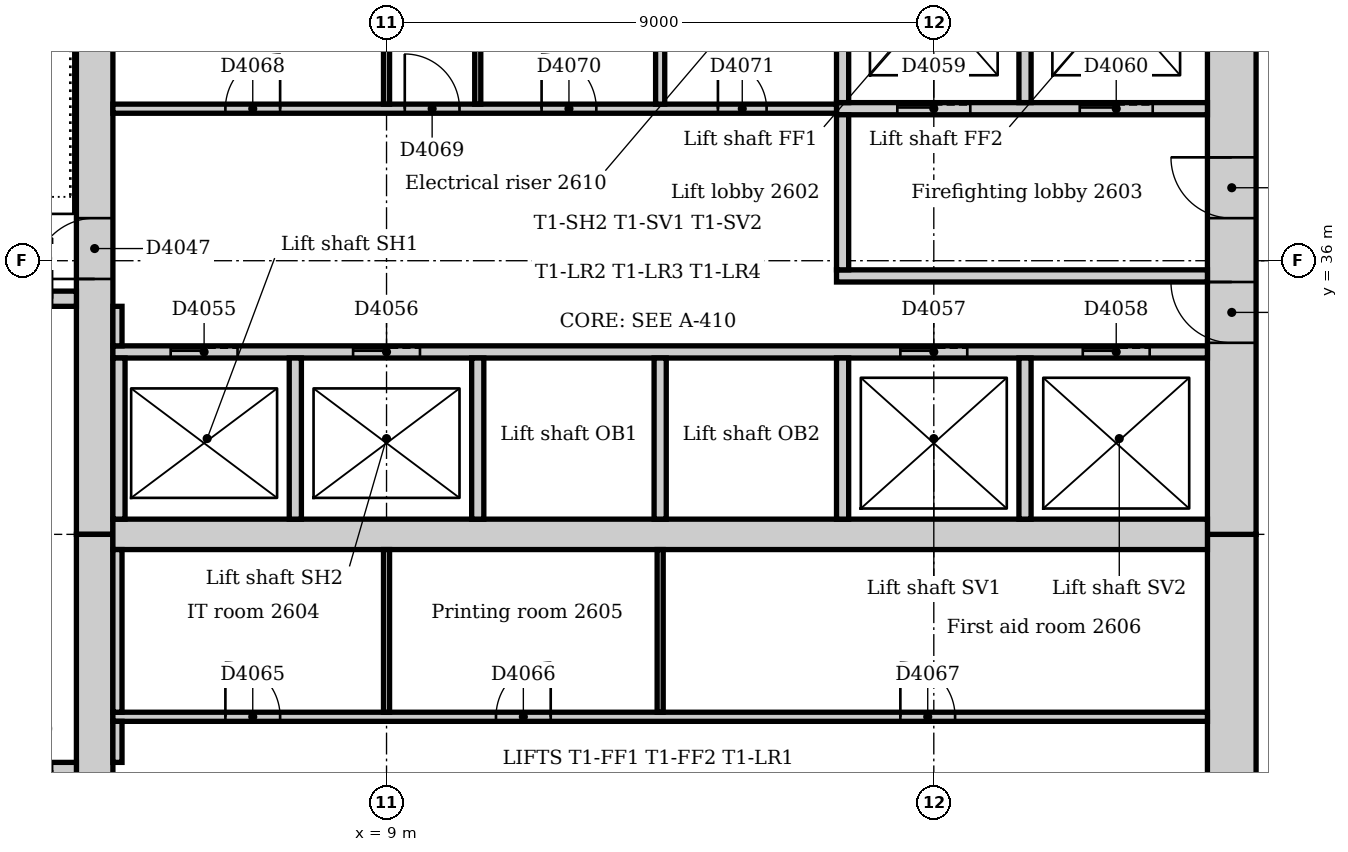
"""IFC4 building model, lengths in metres.
Left out: names, types, materials, properties, quantities, classifications, styles, units other than length and angle.
Written with IfcOpenShell. Run it as: python <this file> out.ifc"""

import sys

from ifc_helpers import new_model, si_unit, direction, frame, frame_2d, origin, place, context, subcontext, project, spatial, rectangle, extrude, element, fill, save


model = new_model("IFC4")
c1 = context("Model", 3, precision=1e-05, world=origin(), true_north=direction((0.0, 1.0)))
c2 = subcontext(c1, "Body", "Model", "MODEL_VIEW")
j1 = project(units=[si_unit("LENGTHUNIT", "METRE"), si_unit("PLANEANGLEUNIT", "RADIAN")], contexts=[c1])
p1 = place(None, origin())
s1 = spatial("IfcSite", under=j1, at=p1, CompositionType="ELEMENT")
p2 = place(p1, origin())
s2 = spatial("IfcBuilding", under=s1, at=p2, CompositionType="ELEMENT")
p3 = place(p2, frame((0.0, 0.0, 112.0)))
s3 = spatial("IfcBuildingStorey", under=s2, at=p3, CompositionType="ELEMENT", Elevation=112.0)
p4 = place(p3, frame((22.9, 21.0, 0.0), z_axis=(0.0, 0.0, 1.0), x_axis=(0.0, 1.0, 0.0)))
e1 = element("IfcWall", 1, at=p4, inside=s3, PredefinedType="SOLIDWALL", context=c2, shape_type="SweptSolid", body=[
    extrude(rectangle(XDim=10.5, YDim=0.8, at=frame_2d((5.25, 0.0))), origin(), (0.0, 0.0, 1.0), 4.0),
])
p5 = place(p4, frame((4.35, 0.0, 0.0)))
e2 = element("IfcOpeningElement", 2, at=p5, cuts=e1, PredefinedType="OPENING", context=c2, shape_type="SweptSolid", body=[
    extrude(rectangle(XDim=1.8, YDim=2.1, at=frame_2d((0.9, 1.05))), frame((0.0, 0.41, 0.0), z_axis=(0.0, -1.0, 0.0), x_axis=(1.0, 0.0, 0.0)), (0.0, 0.0, 1.0), 0.82),
])
p6 = place(p3, frame((22.9, 31.5, 0.0), z_axis=(0.0, 0.0, 1.0), x_axis=(0.0, 1.0, 0.0)))
e3 = element("IfcWall", 3, at=p6, inside=s3, PredefinedType="SOLIDWALL", context=c2, shape_type="SweptSolid", body=[
    extrude(rectangle(XDim=10.5, YDim=0.8, at=frame_2d((5.25, 0.0))), origin(), (0.0, 0.0, 1.0), 4.0),
])
p7 = place(p6, frame((3.15, 0.0, 0.0)))
e4 = element("IfcOpeningElement", 4, at=p7, cuts=e3, PredefinedType="OPENING", context=c2, shape_type="SweptSolid", body=[
    extrude(rectangle(XDim=1.0, YDim=2.1, at=frame_2d((0.5, 1.05))), frame((0.0, 0.41, 0.0), z_axis=(0.0, -1.0, 0.0), x_axis=(1.0, 0.0, 0.0)), (0.0, 0.0, 1.0), 0.82),
])
p8 = place(p6, frame((5.2, 0.0, 0.0)))
e5 = element("IfcOpeningElement", 5, at=p8, cuts=e3, PredefinedType="OPENING", context=c2, shape_type="SweptSolid", body=[
    extrude(rectangle(XDim=1.0, YDim=2.1, at=frame_2d((0.5, 1.05))), frame((0.0, 0.41, 0.0), z_axis=(0.0, -1.0, 0.0), x_axis=(1.0, 0.0, 0.0)), (0.0, 0.0, 1.0), 0.82),
])
p9 = place(p3, frame((4.2, 42.0, 0.0), z_axis=(0.0, 0.0, 1.0), x_axis=(0.0, -1.0, 0.0)))
e6 = element("IfcWall", 6, at=p9, inside=s3, PredefinedType="SOLIDWALL", context=c2, shape_type="SweptSolid", body=[
    extrude(rectangle(XDim=10.5, YDim=0.6, at=frame_2d((5.25, 0.0))), origin(), (0.0, 0.0, 1.0), 4.0),
])
p10 = place(p9, frame((5.3, 0.0, 0.0)))
e7 = element("IfcOpeningElement", 7, at=p10, cuts=e6, PredefinedType="OPENING", context=c2, shape_type="SweptSolid", body=[
    extrude(rectangle(XDim=1.0, YDim=2.1, at=frame_2d((0.5, 1.05))), frame((0.0, 0.31, 0.0), z_axis=(0.0, -1.0, 0.0), x_axis=(1.0, 0.0, 0.0)), (0.0, 0.0, 1.0), 0.62),
])
p11 = place(p3, frame((4.2, 31.5, 0.0), z_axis=(0.0, 0.0, 1.0), x_axis=(0.0, -1.0, 0.0)))
e8 = element("IfcWall", 8, at=p11, inside=s3, PredefinedType="SOLIDWALL", context=c2, shape_type="SweptSolid", body=[
    extrude(rectangle(XDim=10.5, YDim=0.6, at=frame_2d((5.25, 0.0))), origin(), (0.0, 0.0, 1.0), 4.0),
])
p12 = place(p11, frame((4.25, 0.0, 0.0)))
e9 = element("IfcOpeningElement", 9, at=p12, cuts=e8, PredefinedType="OPENING", context=c2, shape_type="SweptSolid", body=[
    extrude(rectangle(XDim=1.0, YDim=2.1, at=frame_2d((0.5, 1.05))), frame((0.0, 0.31, 0.0), z_axis=(0.0, -1.0, 0.0), x_axis=(1.0, 0.0, 0.0)), (0.0, 0.0, 1.0), 0.62),
])
p13 = place(p3, frame((4.5, 31.5, 0.0), z_axis=(0.0, 0.0, 1.0), x_axis=(1.0, 0.0, 0.0)))
e10 = element("IfcWall", 10, at=p13, inside=s3, PredefinedType="SOLIDWALL", context=c2, shape_type="SweptSolid", body=[
    extrude(rectangle(XDim=18.0, YDim=0.5, at=frame_2d((9.0, 0.0))), origin(), (0.0, 0.0, 1.0), 4.0),
])
p14 = place(p3, frame((3.9, 27.625, 0.0), z_axis=(0.0, 0.0, 1.0), x_axis=(-1.0, 0.0, 0.0)))
e11 = element("IfcWall", 11, at=p14, inside=s3, PredefinedType="SOLIDWALL", context=c2, shape_type="SweptSolid", body=[
    extrude(rectangle(XDim=3.54, YDim=0.25, at=frame_2d((1.77, 0.0))), origin(), (0.0, 0.0, 1.0), 4.0),
])
p15 = place(p14, frame((0.4, 0.0, 0.0)))
e12 = element("IfcOpeningElement", 12, at=p15, cuts=e11, PredefinedType="OPENING", context=c2, shape_type="SweptSolid", body=[
    extrude(rectangle(XDim=1.0, YDim=2.1, at=frame_2d((0.5, 1.05))), frame((0.0, 0.135, 0.0), z_axis=(0.0, -1.0, 0.0), x_axis=(1.0, 0.0, 0.0)), (0.0, 0.0, 1.0), 0.27),
])
p16 = place(p3, frame((0.36, 35.375, 0.0), z_axis=(0.0, 0.0, 1.0), x_axis=(1.0, 0.0, 0.0)))
e13 = element("IfcWall", 13, at=p16, inside=s3, PredefinedType="SOLIDWALL", context=c2, shape_type="SweptSolid", body=[
    extrude(rectangle(XDim=3.54, YDim=0.25, at=frame_2d((1.77, 0.0))), origin(), (0.0, 0.0, 1.0), 4.0),
])
p17 = place(p16, frame((2.14, 0.0, 0.0)))
e14 = element("IfcOpeningElement", 14, at=p17, cuts=e13, PredefinedType="OPENING", context=c2, shape_type="SweptSolid", body=[
    extrude(rectangle(XDim=1.0, YDim=2.1, at=frame_2d((0.5, 1.05))), frame((0.0, 0.135, 0.0), z_axis=(0.0, -1.0, 0.0), x_axis=(1.0, 0.0, 0.0)), (0.0, 0.0, 1.0), 0.27),
])
p18 = place(p3, frame((16.4, 35.75, 0.0), z_axis=(0.0, 0.0, 1.0), x_axis=(1.0, 0.0, 0.0)))
e15 = element("IfcWall", 15, at=p18, inside=s3, PredefinedType="PARTITIONING", context=c2, shape_type="SweptSolid", body=[
    extrude(rectangle(XDim=6.1, YDim=0.2, at=frame_2d((3.05, 0.0))), origin(), (0.0, 0.0, 1.0), 3.85),
])
p19 = place(p3, frame((16.4, 38.5, 0.0), z_axis=(0.0, 0.0, 1.0), x_axis=(1.0, 0.0, 0.0)))
e16 = element("IfcWall", 16, at=p19, inside=s3, PredefinedType="PARTITIONING", context=c2, shape_type="SweptSolid", body=[
    extrude(rectangle(XDim=6.1, YDim=0.2, at=frame_2d((3.05, 0.0))), origin(), (0.0, 0.0, 1.0), 3.85),
])
p20 = place(p19, frame((1.0, 0.0, 0.0)))
e17 = element("IfcOpeningElement", 17, at=p20, cuts=e16, PredefinedType="OPENING", context=c2, shape_type="SweptSolid", body=[
    extrude(rectangle(XDim=1.2, YDim=2.1, at=frame_2d((0.6, 1.05))), frame((0.0, 0.11, 0.0), z_axis=(0.0, -1.0, 0.0), x_axis=(1.0, 0.0, 0.0)), (0.0, 0.0, 1.0), 0.22),
])
p21 = place(p19, frame((4.0, 0.0, 0.0)))
e18 = element("IfcOpeningElement", 18, at=p21, cuts=e16, PredefinedType="OPENING", context=c2, shape_type="SweptSolid", body=[
    extrude(rectangle(XDim=1.2, YDim=2.1, at=frame_2d((0.6, 1.05))), frame((0.0, 0.11, 0.0), z_axis=(0.0, -1.0, 0.0), x_axis=(1.0, 0.0, 0.0)), (0.0, 0.0, 1.0), 0.22),
])
p22 = place(p3, frame((16.5, 35.85, 0.0), z_axis=(0.0, 0.0, 1.0), x_axis=(0.0, 1.0, 0.0)))
e19 = element("IfcWall", 19, at=p22, inside=s3, PredefinedType="PARTITIONING", context=c2, shape_type="SweptSolid", body=[
    extrude(rectangle(XDim=2.55, YDim=0.2, at=frame_2d((1.275, 0.0))), origin(), (0.0, 0.0, 1.0), 3.85),
])
p23 = place(p3, frame((4.5, 34.5, 0.0), z_axis=(0.0, 0.0, 1.0), x_axis=(1.0, 0.0, 0.0)))
e20 = element("IfcWall", 20, at=p23, inside=s3, PredefinedType="PARTITIONING", context=c2, shape_type="SweptSolid", body=[
    extrude(rectangle(XDim=18.0, YDim=0.2, at=frame_2d((9.0, 0.0))), origin(), (0.0, 0.0, 1.0), 3.85),
])
p24 = place(p23, frame((0.95, 0.0, 0.0)))
e21 = element("IfcOpeningElement", 21, at=p24, cuts=e20, PredefinedType="OPENING", context=c2, shape_type="SweptSolid", body=[
    extrude(rectangle(XDim=1.1, YDim=2.1, at=frame_2d((0.55, 1.05))), frame((0.0, 0.11, 0.0), z_axis=(0.0, -1.0, 0.0), x_axis=(1.0, 0.0, 0.0)), (0.0, 0.0, 1.0), 0.22),
])
p25 = place(p23, frame((3.95, 0.0, 0.0)))
e22 = element("IfcOpeningElement", 22, at=p25, cuts=e20, PredefinedType="OPENING", context=c2, shape_type="SweptSolid", body=[
    extrude(rectangle(XDim=1.1, YDim=2.1, at=frame_2d((0.55, 1.05))), frame((0.0, 0.11, 0.0), z_axis=(0.0, -1.0, 0.0), x_axis=(1.0, 0.0, 0.0)), (0.0, 0.0, 1.0), 0.22),
])
p26 = place(p23, frame((12.95, 0.0, 0.0)))
e23 = element("IfcOpeningElement", 23, at=p26, cuts=e20, PredefinedType="OPENING", context=c2, shape_type="SweptSolid", body=[
    extrude(rectangle(XDim=1.1, YDim=2.1, at=frame_2d((0.55, 1.05))), frame((0.0, 0.11, 0.0), z_axis=(0.0, -1.0, 0.0), x_axis=(1.0, 0.0, 0.0)), (0.0, 0.0, 1.0), 0.22),
])
p27 = place(p23, frame((15.95, 0.0, 0.0)))
e24 = element("IfcOpeningElement", 24, at=p27, cuts=e20, PredefinedType="OPENING", context=c2, shape_type="SweptSolid", body=[
    extrude(rectangle(XDim=1.1, YDim=2.1, at=frame_2d((0.55, 1.05))), frame((0.0, 0.11, 0.0), z_axis=(0.0, -1.0, 0.0), x_axis=(1.0, 0.0, 0.0)), (0.0, 0.0, 1.0), 0.22),
])
for number, where, z_axis, x_axis in (
    (25, (16.5, 38.6, 0.0), (0.0, 0.0, 1.0), (0.0, 1.0, 0.0)),
    (26, (19.5, 38.6, 0.0), (0.0, 0.0, 1.0), (0.0, 1.0, 0.0)),
):
    element("IfcWall", number, at=place(p3, frame(where, z_axis=z_axis, x_axis=x_axis)), inside=s3, PredefinedType="PARTITIONING", context=c2, shape_type="SweptSolid", body=[
        extrude(rectangle(XDim=3.4, YDim=0.2, at=frame_2d((1.7, 0.0))), origin(), (0.0, 0.0, 1.0), 3.85),
    ])
for number, where, z_axis, x_axis in (
    (27, (4.6, 31.75, 0.0), (0.0, 0.0, 1.0), (0.0, 1.0, 0.0)),
    (28, (7.5, 31.75, 0.0), (0.0, 0.0, 1.0), (0.0, 1.0, 0.0)),
    (29, (10.5, 31.75, 0.0), (0.0, 0.0, 1.0), (0.0, 1.0, 0.0)),
    (30, (13.5, 31.75, 0.0), (0.0, 0.0, 1.0), (0.0, 1.0, 0.0)),
    (31, (16.5, 31.75, 0.0), (0.0, 0.0, 1.0), (0.0, 1.0, 0.0)),
    (32, (19.5, 31.75, 0.0), (0.0, 0.0, 1.0), (0.0, 1.0, 0.0)),
):
    element("IfcWall", number, at=place(p3, frame(where, z_axis=z_axis, x_axis=x_axis)), inside=s3, PredefinedType="PARTITIONING", context=c2, shape_type="SweptSolid", body=[
        extrude(rectangle(XDim=2.65, YDim=0.2, at=frame_2d((1.325, 0.0))), origin(), (0.0, 0.0, 1.0), 3.85),
    ])
p28 = place(p3, frame((4.5, 28.5, 0.0), z_axis=(0.0, 0.0, 1.0), x_axis=(1.0, 0.0, 0.0)))
e33 = element("IfcWall", 33, at=p28, inside=s3, PredefinedType="PARTITIONING", context=c2, shape_type="SweptSolid", body=[
    extrude(rectangle(XDim=18.0, YDim=0.15, at=frame_2d((9.0, 0.0))), origin(), (0.0, 0.0, 1.0), 3.85),
])
p29 = place(p28, frame((1.85, 0.0, 0.0)))
e34 = element("IfcOpeningElement", 34, at=p29, cuts=e33, PredefinedType="OPENING", context=c2, shape_type="SweptSolid", body=[
    extrude(rectangle(XDim=0.9, YDim=2.1, at=frame_2d((0.45, 1.05))), frame((0.0, 0.085, 0.0), z_axis=(0.0, -1.0, 0.0), x_axis=(1.0, 0.0, 0.0)), (0.0, 0.0, 1.0), 0.17),
])
p30 = place(p28, frame((6.3, 0.0, 0.0)))
e35 = element("IfcOpeningElement", 35, at=p30, cuts=e33, PredefinedType="OPENING", context=c2, shape_type="SweptSolid", body=[
    extrude(rectangle(XDim=0.9, YDim=2.1, at=frame_2d((0.45, 1.05))), frame((0.0, 0.085, 0.0), z_axis=(0.0, -1.0, 0.0), x_axis=(1.0, 0.0, 0.0)), (0.0, 0.0, 1.0), 0.17),
])
p31 = place(p28, frame((12.95, 0.0, 0.0)))
e36 = element("IfcOpeningElement", 36, at=p31, cuts=e33, PredefinedType="OPENING", context=c2, shape_type="SweptSolid", body=[
    extrude(rectangle(XDim=0.9, YDim=2.1, at=frame_2d((0.45, 1.05))), frame((0.0, 0.085, 0.0), z_axis=(0.0, -1.0, 0.0), x_axis=(1.0, 0.0, 0.0)), (0.0, 0.0, 1.0), 0.17),
])
p32 = place(p3, frame((4.5, 38.5, 0.0), z_axis=(0.0, 0.0, 1.0), x_axis=(1.0, 0.0, 0.0)))
e37 = element("IfcWall", 37, at=p32, inside=s3, PredefinedType="PARTITIONING", context=c2, shape_type="SweptSolid", body=[
    extrude(rectangle(XDim=11.9, YDim=0.15, at=frame_2d((5.95, 0.0))), origin(), (0.0, 0.0, 1.0), 3.85),
])
p33 = place(p32, frame((1.85, 0.0, 0.0)))
e38 = element("IfcOpeningElement", 38, at=p33, cuts=e37, PredefinedType="OPENING", context=c2, shape_type="SweptSolid", body=[
    extrude(rectangle(XDim=0.9, YDim=2.1, at=frame_2d((0.45, 1.05))), frame((0.0, 0.085, 0.0), z_axis=(0.0, -1.0, 0.0), x_axis=(1.0, 0.0, 0.0)), (0.0, 0.0, 1.0), 0.17),
])
p34 = place(p32, frame((4.8, 0.0, 0.0)))
e39 = element("IfcOpeningElement", 39, at=p34, cuts=e37, PredefinedType="OPENING", context=c2, shape_type="SweptSolid", body=[
    extrude(rectangle(XDim=0.9, YDim=2.1, at=frame_2d((0.45, 1.05))), frame((0.0, 0.085, 0.0), z_axis=(0.0, -1.0, 0.0), x_axis=(1.0, 0.0, 0.0)), (0.0, 0.0, 1.0), 0.17),
])
p35 = place(p32, frame((7.05, 0.0, 0.0)))
e40 = element("IfcOpeningElement", 40, at=p35, cuts=e37, PredefinedType="OPENING", context=c2, shape_type="SweptSolid", body=[
    extrude(rectangle(XDim=0.9, YDim=2.1, at=frame_2d((0.45, 1.05))), frame((0.0, 0.085, 0.0), z_axis=(0.0, -1.0, 0.0), x_axis=(1.0, 0.0, 0.0)), (0.0, 0.0, 1.0), 0.17),
])
p36 = place(p32, frame((9.95, 0.0, 0.0)))
e41 = element("IfcOpeningElement", 41, at=p36, cuts=e37, PredefinedType="OPENING", context=c2, shape_type="SweptSolid", body=[
    extrude(rectangle(XDim=0.8, YDim=2.1, at=frame_2d((0.4, 1.05))), frame((0.0, 0.085, 0.0), z_axis=(0.0, -1.0, 0.0), x_axis=(1.0, 0.0, 0.0)), (0.0, 0.0, 1.0), 0.17),
])
p37 = place(p3, frame((4.575, 27.75, 0.0), z_axis=(0.0, 0.0, 1.0), x_axis=(0.0, 1.0, 0.0)))
e42 = element("IfcWall", 42, at=p37, inside=s3, PredefinedType="PARTITIONING", context=c2, shape_type="SweptSolid", body=[
    extrude(rectangle(XDim=0.675, YDim=0.15, at=frame_2d((0.338, 0.0))), origin(), (0.0, 0.0, 1.0), 3.85),
])
p38 = place(p3, frame((4.575, 28.575, 0.0), z_axis=(0.0, 0.0, 1.0), x_axis=(0.0, 1.0, 0.0)))
e43 = element("IfcWall", 43, at=p38, inside=s3, PredefinedType="PARTITIONING", context=c2, shape_type="SweptSolid", body=[
    extrude(rectangle(XDim=2.675, YDim=0.15, at=frame_2d((1.337, 0.0))), origin(), (0.0, 0.0, 1.0), 3.85),
])
p39 = place(p3, frame((4.575, 34.6, 0.0), z_axis=(0.0, 0.0, 1.0), x_axis=(0.0, 1.0, 0.0)))
e44 = element("IfcWall", 44, at=p39, inside=s3, PredefinedType="PARTITIONING", context=c2, shape_type="SweptSolid", body=[
    extrude(rectangle(XDim=0.65, YDim=0.15, at=frame_2d((0.325, 0.0))), origin(), (0.0, 0.0, 1.0), 3.85),
])
p40 = place(p3, frame((13.5, 38.575, 0.0), z_axis=(0.0, 0.0, 1.0), x_axis=(0.0, 1.0, 0.0)))
e45 = element("IfcWall", 45, at=p40, inside=s3, PredefinedType="PARTITIONING", context=c2, shape_type="SweptSolid", body=[
    extrude(rectangle(XDim=3.425, YDim=0.15, at=frame_2d((1.712, 0.0))), origin(), (0.0, 0.0, 1.0), 3.85),
])
for number, where, z_axis, x_axis in (
    (46, (9.0, 38.575, 0.0), (0.0, 0.0, 1.0), (0.0, 1.0, 0.0)),
    (47, (10.5, 38.575, 0.0), (0.0, 0.0, 1.0), (0.0, 1.0, 0.0)),
):
    element("IfcWall", number, at=place(p3, frame(where, z_axis=z_axis, x_axis=x_axis)), inside=s3, PredefinedType="PARTITIONING", context=c2, shape_type="SweptSolid", body=[
        extrude(rectangle(XDim=3.425, YDim=0.1, at=frame_2d((1.712, 0.0))), origin(), (0.0, 0.0, 1.0), 3.85),
    ])
for number, where, z_axis, x_axis in (
    (48, (9.0, 28.575, 0.0), (0.0, 0.0, 1.0), (0.0, 1.0, 0.0)),
    (49, (13.5, 28.575, 0.0), (0.0, 0.0, 1.0), (0.0, 1.0, 0.0)),
):
    element("IfcWall", number, at=place(p3, frame(where, z_axis=z_axis, x_axis=x_axis)), inside=s3, PredefinedType="PARTITIONING", context=c2, shape_type="SweptSolid", body=[
        extrude(rectangle(XDim=2.675, YDim=0.1, at=frame_2d((1.337, 0.0))), origin(), (0.0, 0.0, 1.0), 3.85),
    ])
p41 = place(p10, frame((1.0, 0.0, 0.0), z_axis=(0.0, 0.0, 1.0), x_axis=(-1.0, 0.0, 0.0)))
e50 = element("IfcDoor", 50, at=p41, inside=s3, OperationType="SINGLE_SWING_LEFT", PredefinedType="DOOR", context=c2, shape_type="SweptSolid", body=[
    extrude(rectangle(XDim=1.0, YDim=2.1, at=frame_2d((0.5, 1.05))), frame((0.0, 0.025, 0.0), z_axis=(0.0, -1.0, 0.0), x_axis=(1.0, 0.0, 0.0)), (0.0, 0.0, 1.0), 0.05),
])
fill(e7, e50)
p42 = place(p24, origin())
e51 = element("IfcDoor", 51, at=p42, inside=s3, OperationType="SLIDING_TO_LEFT", PredefinedType="DOOR", context=c2, shape_type="SweptSolid", body=[
    extrude(rectangle(XDim=1.1, YDim=2.1, at=frame_2d((0.55, 1.05))), frame((0.0, 0.025, 0.0), z_axis=(0.0, -1.0, 0.0), x_axis=(1.0, 0.0, 0.0)), (0.0, 0.0, 1.0), 0.05),
])
fill(e21, e51)
p43 = place(p25, origin())
e52 = element("IfcDoor", 52, at=p43, inside=s3, OperationType="SLIDING_TO_LEFT", PredefinedType="DOOR", context=c2, shape_type="SweptSolid", body=[
    extrude(rectangle(XDim=1.1, YDim=2.1, at=frame_2d((0.55, 1.05))), frame((0.0, 0.025, 0.0), z_axis=(0.0, -1.0, 0.0), x_axis=(1.0, 0.0, 0.0)), (0.0, 0.0, 1.0), 0.05),
])
fill(e22, e52)
p44 = place(p26, origin())
e53 = element("IfcDoor", 53, at=p44, inside=s3, OperationType="SLIDING_TO_LEFT", PredefinedType="DOOR", context=c2, shape_type="SweptSolid", body=[
    extrude(rectangle(XDim=1.1, YDim=2.1, at=frame_2d((0.55, 1.05))), frame((0.0, 0.025, 0.0), z_axis=(0.0, -1.0, 0.0), x_axis=(1.0, 0.0, 0.0)), (0.0, 0.0, 1.0), 0.05),
])
fill(e23, e53)
p45 = place(p27, origin())
e54 = element("IfcDoor", 54, at=p45, inside=s3, OperationType="SLIDING_TO_LEFT", PredefinedType="DOOR", context=c2, shape_type="SweptSolid", body=[
    extrude(rectangle(XDim=1.1, YDim=2.1, at=frame_2d((0.55, 1.05))), frame((0.0, 0.025, 0.0), z_axis=(0.0, -1.0, 0.0), x_axis=(1.0, 0.0, 0.0)), (0.0, 0.0, 1.0), 0.05),
])
fill(e24, e54)
p46 = place(p20, origin())
e55 = element("IfcDoor", 55, at=p46, inside=s3, OperationType="SLIDING_TO_LEFT", PredefinedType="DOOR", context=c2, shape_type="SweptSolid", body=[
    extrude(rectangle(XDim=1.2, YDim=2.1, at=frame_2d((0.6, 1.05))), frame((0.0, 0.025, 0.0), z_axis=(0.0, -1.0, 0.0), x_axis=(1.0, 0.0, 0.0)), (0.0, 0.0, 1.0), 0.05),
])
fill(e17, e55)
p47 = place(p21, origin())
e56 = element("IfcDoor", 56, at=p47, inside=s3, OperationType="SLIDING_TO_LEFT", PredefinedType="DOOR", context=c2, shape_type="SweptSolid", body=[
    extrude(rectangle(XDim=1.2, YDim=2.1, at=frame_2d((0.6, 1.05))), frame((0.0, 0.025, 0.0), z_axis=(0.0, -1.0, 0.0), x_axis=(1.0, 0.0, 0.0)), (0.0, 0.0, 1.0), 0.05),
])
fill(e18, e56)
p48 = place(p7, origin())
e57 = element("IfcDoor", 57, at=p48, inside=s3, OperationType="SINGLE_SWING_RIGHT", PredefinedType="DOOR", context=c2, shape_type="SweptSolid", body=[
    extrude(rectangle(XDim=1.0, YDim=2.1, at=frame_2d((0.5, 1.05))), frame((0.0, 0.025, 0.0), z_axis=(0.0, -1.0, 0.0), x_axis=(1.0, 0.0, 0.0)), (0.0, 0.0, 1.0), 0.05),
])
fill(e4, e57)
p49 = place(p8, origin())
e58 = element("IfcDoor", 58, at=p49, inside=s3, OperationType="SINGLE_SWING_RIGHT", PredefinedType="DOOR", context=c2, shape_type="SweptSolid", body=[
    extrude(rectangle(XDim=1.0, YDim=2.1, at=frame_2d((0.5, 1.05))), frame((0.0, 0.025, 0.0), z_axis=(0.0, -1.0, 0.0), x_axis=(1.0, 0.0, 0.0)), (0.0, 0.0, 1.0), 0.05),
])
fill(e5, e58)
p50 = place(p29, origin())
e59 = element("IfcDoor", 59, at=p50, inside=s3, OperationType="SINGLE_SWING_LEFT", PredefinedType="DOOR", context=c2, shape_type="SweptSolid", body=[
    extrude(rectangle(XDim=0.9, YDim=2.1, at=frame_2d((0.45, 1.05))), frame((0.0, 0.025, 0.0), z_axis=(0.0, -1.0, 0.0), x_axis=(1.0, 0.0, 0.0)), (0.0, 0.0, 1.0), 0.05),
])
fill(e34, e59)
p51 = place(p30, origin())
e60 = element("IfcDoor", 60, at=p51, inside=s3, OperationType="SINGLE_SWING_RIGHT", PredefinedType="DOOR", context=c2, shape_type="SweptSolid", body=[
    extrude(rectangle(XDim=0.9, YDim=2.1, at=frame_2d((0.45, 1.05))), frame((0.0, 0.025, 0.0), z_axis=(0.0, -1.0, 0.0), x_axis=(1.0, 0.0, 0.0)), (0.0, 0.0, 1.0), 0.05),
])
fill(e35, e60)
p52 = place(p31, origin())
e61 = element("IfcDoor", 61, at=p52, inside=s3, OperationType="SINGLE_SWING_LEFT", PredefinedType="DOOR", context=c2, shape_type="SweptSolid", body=[
    extrude(rectangle(XDim=0.9, YDim=2.1, at=frame_2d((0.45, 1.05))), frame((0.0, 0.025, 0.0), z_axis=(0.0, -1.0, 0.0), x_axis=(1.0, 0.0, 0.0)), (0.0, 0.0, 1.0), 0.05),
])
fill(e36, e61)
p53 = place(p33, origin())
e62 = element("IfcDoor", 62, at=p53, inside=s3, OperationType="SINGLE_SWING_RIGHT", PredefinedType="DOOR", context=c2, shape_type="SweptSolid", body=[
    extrude(rectangle(XDim=0.9, YDim=2.1, at=frame_2d((0.45, 1.05))), frame((0.0, 0.025, 0.0), z_axis=(0.0, -1.0, 0.0), x_axis=(1.0, 0.0, 0.0)), (0.0, 0.0, 1.0), 0.05),
])
fill(e38, e62)
p54 = place(p34, origin())
e63 = element("IfcDoor", 63, at=p54, inside=s3, OperationType="SINGLE_SWING_LEFT", PredefinedType="DOOR", context=c2, shape_type="SweptSolid", body=[
    extrude(rectangle(XDim=0.9, YDim=2.1, at=frame_2d((0.45, 1.05))), frame((0.0, 0.025, 0.0), z_axis=(0.0, -1.0, 0.0), x_axis=(1.0, 0.0, 0.0)), (0.0, 0.0, 1.0), 0.05),
])
fill(e39, e63)
p55 = place(p35, origin())
e64 = element("IfcDoor", 64, at=p55, inside=s3, OperationType="SINGLE_SWING_LEFT", PredefinedType="DOOR", context=c2, shape_type="SweptSolid", body=[
    extrude(rectangle(XDim=0.9, YDim=2.1, at=frame_2d((0.45, 1.05))), frame((0.0, 0.025, 0.0), z_axis=(0.0, -1.0, 0.0), x_axis=(1.0, 0.0, 0.0)), (0.0, 0.0, 1.0), 0.05),
])
fill(e40, e64)
p56 = place(p36, origin())
e65 = element("IfcDoor", 65, at=p56, inside=s3, OperationType="SINGLE_SWING_LEFT", PredefinedType="DOOR", context=c2, shape_type="SweptSolid", body=[
    extrude(rectangle(XDim=0.8, YDim=2.1, at=frame_2d((0.4, 1.05))), frame((0.0, 0.025, 0.0), z_axis=(0.0, -1.0, 0.0), x_axis=(1.0, 0.0, 0.0)), (0.0, 0.0, 1.0), 0.05),
])
fill(e41, e65)
save(model, sys.argv[1])
